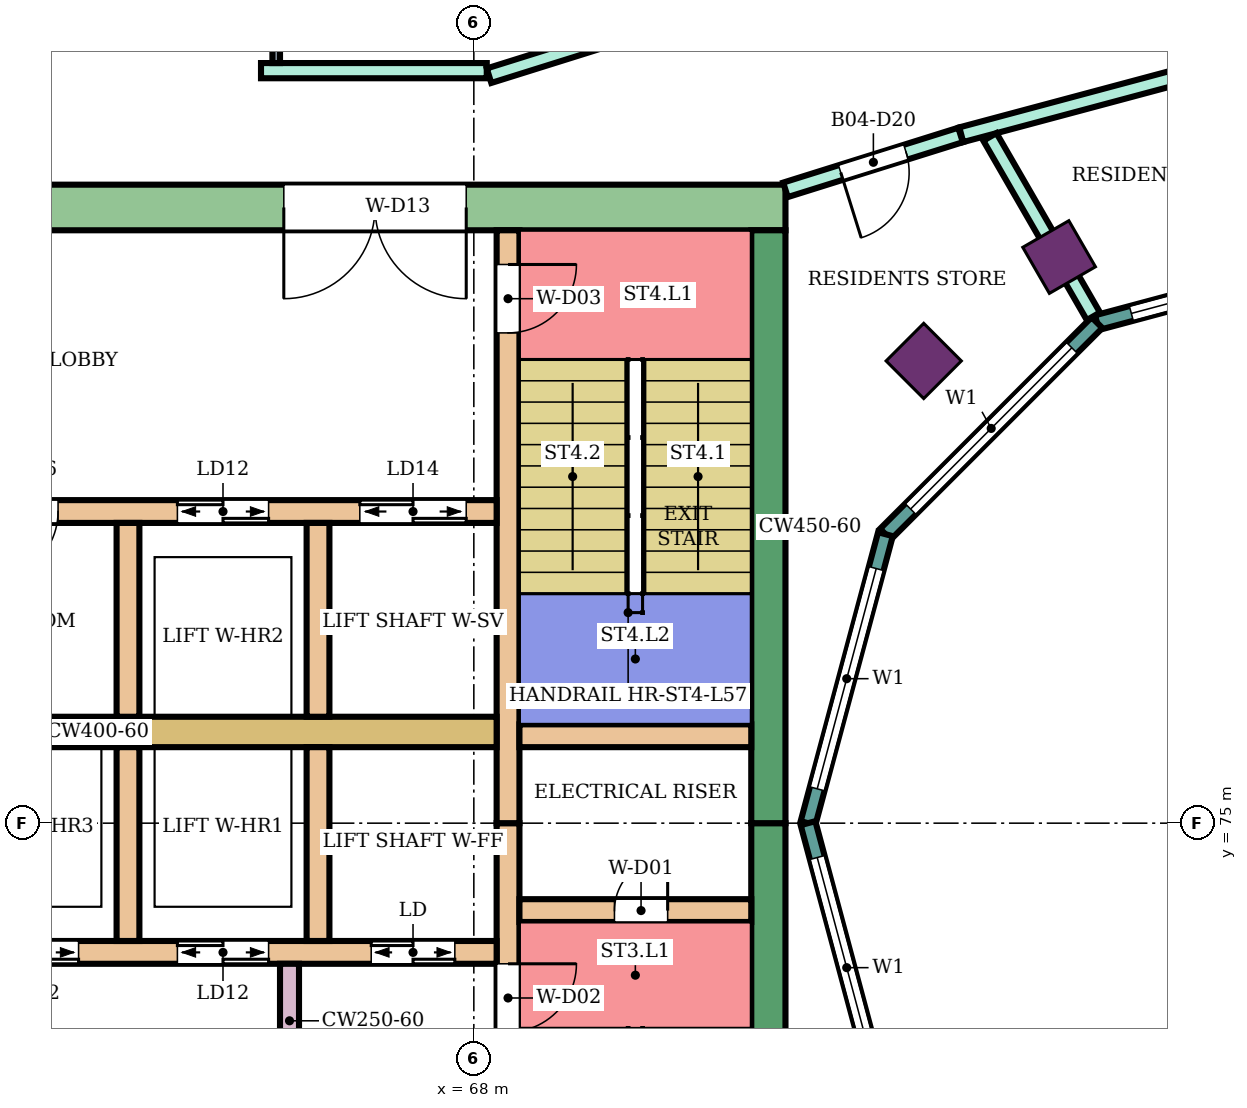
"""IFC4 building model, lengths in metres.
Left out: names, types, materials, properties, quantities, classifications, styles, units other than length and angle.
Written with IfcOpenShell. Run it as: python <this file> out.ifc"""

import sys

from ifc_helpers import new_model, si_unit, direction, frame, frame_2d, origin, origin_2d, place, context, subcontext, project, spatial, rectangle, extrude, element, fill, save


model = new_model("IFC4")
c1 = context("Model", 3, precision=1e-05, world=origin(), true_north=direction((0.0, 1.0)))
c2 = subcontext(c1, "Body", "Model", "MODEL_VIEW")
j1 = project(units=[si_unit("LENGTHUNIT", "METRE"), si_unit("PLANEANGLEUNIT", "RADIAN")], contexts=[c1])
p1 = place(None, origin())
s1 = spatial("IfcSite", under=j1, at=p1, CompositionType="ELEMENT")
p2 = place(p1, origin())
s2 = spatial("IfcBuilding", under=s1, at=p2, CompositionType="ELEMENT")
p3 = place(p2, frame((0.0, 0.0, 249.9)))
s3 = spatial("IfcBuildingStorey", under=s2, at=p3, CompositionType="ELEMENT", Elevation=249.9)
for number, where, z_axis, x_axis in (
    (1, (75.7, 82.448, 0.0), (0.0, 0.0, 1.0), (-0.5, 0.866, 0.0)),
    (2, (73.919, 81.081, 0.0), (0.0, 0.0, 1.0), (-0.707, 0.707, 0.0)),
):
    element("IfcColumn", number, at=place(p3, frame(where, z_axis=z_axis, x_axis=x_axis)), inside=s3, PredefinedType="COLUMN", context=c2, shape_type="SweptSolid", body=[
        extrude(rectangle(XDim=0.7, YDim=0.7, at=origin_2d()), origin(), (0.0, 0.0, 1.0), 4.2),
    ])
p4 = place(p3, frame((72.1, 83.1, 0.0), z_axis=(0.0, 0.0, 1.0), x_axis=(-1.0, 0.0, 0.0)))
e3 = element("IfcWall", 3, at=p4, inside=s3, PredefinedType="SHEAR", context=c2, shape_type="SweptSolid", body=[
    extrude(rectangle(XDim=14.9, YDim=0.6, at=frame_2d((7.45, 0.0))), origin(), (0.0, 0.0, 1.0), 3.88),
])
p5 = place(p4, frame((4.2, 0.0, 0.0)))
e4 = element("IfcOpeningElement", 4, at=p5, cuts=e3, PredefinedType="OPENING", context=c2, shape_type="SweptSolid", body=[
    extrude(rectangle(XDim=2.4, YDim=2.4, at=frame_2d((1.2, 1.2))), frame((0.0, 0.31, 0.0), z_axis=(0.0, -1.0, 0.0), x_axis=(1.0, 0.0, 0.0)), (0.0, 0.0, 1.0), 0.62),
])
for number, where, z_axis, x_axis in (
    (5, (71.875, 75.0, 0.0), (0.0, 0.0, 1.0), (0.0, -1.0, 0.0)),
    (6, (71.875, 82.8, 0.0), (0.0, 0.0, 1.0), (0.0, -1.0, 0.0)),
):
    element("IfcWall", number, at=place(p3, frame(where, z_axis=z_axis, x_axis=x_axis)), inside=s3, PredefinedType="SHEAR", context=c2, shape_type="SweptSolid", body=[
        extrude(rectangle(XDim=7.8, YDim=0.45, at=frame_2d((3.9, 0.0))), origin(), (0.0, 0.0, 1.0), 3.88),
    ])
p6 = place(p3, frame((68.45, 75.0, 0.0), z_axis=(0.0, 0.0, 1.0), x_axis=(0.0, -1.0, 0.0)))
e7 = element("IfcWall", 7, at=p6, inside=s3, PredefinedType="SHEAR", context=c2, shape_type="SweptSolid", body=[
    extrude(rectangle(XDim=7.8, YDim=0.3, at=frame_2d((3.9, 0.0))), origin(), (0.0, 0.0, 1.0), 3.88),
])
p7 = place(p6, frame((1.85, 0.0, 0.0)))
e8 = element("IfcOpeningElement", 8, at=p7, cuts=e7, PredefinedType="OPENING", context=c2, shape_type="SweptSolid", body=[
    extrude(rectangle(XDim=0.9, YDim=2.1, at=frame_2d((0.45, 1.05))), frame((0.0, 0.16, 0.0), z_axis=(0.0, -1.0, 0.0), x_axis=(1.0, 0.0, 0.0)), (0.0, 0.0, 1.0), 0.32),
])
p8 = place(p3, frame((68.45, 82.8, 0.0), z_axis=(0.0, 0.0, 1.0), x_axis=(0.0, -1.0, 0.0)))
e9 = element("IfcWall", 9, at=p8, inside=s3, PredefinedType="SHEAR", context=c2, shape_type="SweptSolid", body=[
    extrude(rectangle(XDim=7.8, YDim=0.3, at=frame_2d((3.9, 0.0))), origin(), (0.0, 0.0, 1.0), 3.88),
])
p9 = place(p8, frame((0.45, 0.0, 0.0)))
e10 = element("IfcOpeningElement", 10, at=p9, cuts=e9, PredefinedType="OPENING", context=c2, shape_type="SweptSolid", body=[
    extrude(rectangle(XDim=0.9, YDim=2.1, at=frame_2d((0.45, 1.05))), frame((0.0, 0.16, 0.0), z_axis=(0.0, -1.0, 0.0), x_axis=(1.0, 0.0, 0.0)), (0.0, 0.0, 1.0), 0.32),
])
p10 = place(p3, frame((71.65, 73.85, 0.0), z_axis=(0.0, 0.0, 1.0), x_axis=(-1.0, 0.0, 0.0)))
e11 = element("IfcWall", 11, at=p10, inside=s3, PredefinedType="SHEAR", context=c2, shape_type="SweptSolid", body=[
    extrude(rectangle(XDim=3.05, YDim=0.3, at=frame_2d((1.525, 0.0))), origin(), (0.0, 0.0, 1.0), 3.88),
])
p11 = place(p10, frame((1.1, 0.0, 0.0)))
e12 = element("IfcOpeningElement", 12, at=p11, cuts=e11, PredefinedType="OPENING", context=c2, shape_type="SweptSolid", body=[
    extrude(rectangle(XDim=0.7, YDim=2.0, at=frame_2d((0.35, 1.0))), frame((0.0, 0.16, 0.0), z_axis=(0.0, -1.0, 0.0), x_axis=(1.0, 0.0, 0.0)), (0.0, 0.0, 1.0), 0.32),
])
p12 = place(p3, frame((71.65, 76.15, 0.0), z_axis=(0.0, 0.0, 1.0), x_axis=(-1.0, 0.0, 0.0)))
e13 = element("IfcWall", 13, at=p12, inside=s3, PredefinedType="SHEAR", context=c2, shape_type="SweptSolid", body=[
    extrude(rectangle(XDim=3.05, YDim=0.3, at=frame_2d((1.525, 0.0))), origin(), (0.0, 0.0, 1.0), 3.88),
])
p13 = place(p3, frame((68.3, 73.3, 0.0), z_axis=(0.0, 0.0, 1.0), x_axis=(-1.0, 0.0, 0.0)))
e14 = element("IfcWall", 14, at=p13, inside=s3, PredefinedType="SHEAR", context=c2, shape_type="SweptSolid", body=[
    extrude(rectangle(XDim=11.1, YDim=0.3, at=frame_2d((5.55, 0.0))), origin(), (0.0, 0.0, 1.0), 3.88),
])
p14 = place(p13, frame((0.55, 0.0, 0.0)))
e15 = element("IfcOpeningElement", 15, at=p14, cuts=e14, PredefinedType="OPENING", context=c2, shape_type="SweptSolid", body=[
    extrude(rectangle(XDim=1.1, YDim=2.1, at=frame_2d((0.55, 1.05))), frame((0.0, 0.16, 0.0), z_axis=(0.0, -1.0, 0.0), x_axis=(1.0, 0.0, 0.0)), (0.0, 0.0, 1.0), 0.32),
])
p15 = place(p13, frame((3.0, 0.0, 0.0)))
e16 = element("IfcOpeningElement", 16, at=p15, cuts=e14, PredefinedType="OPENING", context=c2, shape_type="SweptSolid", body=[
    extrude(rectangle(XDim=1.2, YDim=2.1, at=frame_2d((0.6, 1.05))), frame((0.0, 0.16, 0.0), z_axis=(0.0, -1.0, 0.0), x_axis=(1.0, 0.0, 0.0)), (0.0, 0.0, 1.0), 0.32),
])
p16 = place(p13, frame((5.5, 0.0, 0.0)))
e17 = element("IfcOpeningElement", 17, at=p16, cuts=e14, PredefinedType="OPENING", context=c2, shape_type="SweptSolid", body=[
    extrude(rectangle(XDim=1.2, YDim=2.1, at=frame_2d((0.6, 1.05))), frame((0.0, 0.16, 0.0), z_axis=(0.0, -1.0, 0.0), x_axis=(1.0, 0.0, 0.0)), (0.0, 0.0, 1.0), 0.32),
])
p17 = place(p13, frame((7.77, 0.0, 0.0)))
e18 = element("IfcOpeningElement", 18, at=p17, cuts=e14, PredefinedType="OPENING", context=c2, shape_type="SweptSolid", body=[
    extrude(rectangle(XDim=0.9, YDim=2.1, at=frame_2d((0.45, 1.05))), frame((0.0, 0.16, 0.0), z_axis=(0.0, -1.0, 0.0), x_axis=(1.0, 0.0, 0.0)), (0.0, 0.0, 1.0), 0.32),
])
p18 = place(p13, frame((9.57, 0.0, 0.0)))
e19 = element("IfcOpeningElement", 19, at=p18, cuts=e14, PredefinedType="OPENING", context=c2, shape_type="SweptSolid", body=[
    extrude(rectangle(XDim=0.9, YDim=2.1, at=frame_2d((0.45, 1.05))), frame((0.0, 0.16, 0.0), z_axis=(0.0, -1.0, 0.0), x_axis=(1.0, 0.0, 0.0)), (0.0, 0.0, 1.0), 0.32),
])
p19 = place(p3, frame((68.3, 76.2, 0.0), z_axis=(0.0, 0.0, 1.0), x_axis=(-1.0, 0.0, 0.0)))
e20 = element("IfcWall", 20, at=p19, inside=s3, PredefinedType="SHEAR", context=c2, shape_type="SweptSolid", body=[
    extrude(rectangle(XDim=11.1, YDim=0.4, at=frame_2d((5.55, 0.0))), origin(), (0.0, 0.0, 1.0), 3.88),
])
p20 = place(p3, frame((68.3, 79.1, 0.0), z_axis=(0.0, 0.0, 1.0), x_axis=(-1.0, 0.0, 0.0)))
e21 = element("IfcWall", 21, at=p20, inside=s3, PredefinedType="SHEAR", context=c2, shape_type="SweptSolid", body=[
    extrude(rectangle(XDim=11.1, YDim=0.3, at=frame_2d((5.55, 0.0))), origin(), (0.0, 0.0, 1.0), 3.88),
])
p21 = place(p20, frame((0.4, 0.0, 0.0)))
e22 = element("IfcOpeningElement", 22, at=p21, cuts=e21, PredefinedType="OPENING", context=c2, shape_type="SweptSolid", body=[
    extrude(rectangle(XDim=1.4, YDim=2.1, at=frame_2d((0.7, 1.05))), frame((0.0, 0.16, 0.0), z_axis=(0.0, -1.0, 0.0), x_axis=(1.0, 0.0, 0.0)), (0.0, 0.0, 1.0), 0.32),
])
p22 = place(p20, frame((3.0, 0.0, 0.0)))
e23 = element("IfcOpeningElement", 23, at=p22, cuts=e21, PredefinedType="OPENING", context=c2, shape_type="SweptSolid", body=[
    extrude(rectangle(XDim=1.2, YDim=2.1, at=frame_2d((0.6, 1.05))), frame((0.0, 0.16, 0.0), z_axis=(0.0, -1.0, 0.0), x_axis=(1.0, 0.0, 0.0)), (0.0, 0.0, 1.0), 0.32),
])
p23 = place(p20, frame((5.77, 0.0, 0.0)))
e24 = element("IfcOpeningElement", 24, at=p23, cuts=e21, PredefinedType="OPENING", context=c2, shape_type="SweptSolid", body=[
    extrude(rectangle(XDim=0.9, YDim=2.1, at=frame_2d((0.45, 1.05))), frame((0.0, 0.16, 0.0), z_axis=(0.0, -1.0, 0.0), x_axis=(1.0, 0.0, 0.0)), (0.0, 0.0, 1.0), 0.32),
])
p24 = place(p20, frame((8.82, 0.0, 0.0)))
e25 = element("IfcOpeningElement", 25, at=p24, cuts=e21, PredefinedType="OPENING", context=c2, shape_type="SweptSolid", body=[
    extrude(rectangle(XDim=0.9, YDim=2.1, at=frame_2d((0.45, 1.05))), frame((0.0, 0.16, 0.0), z_axis=(0.0, -1.0, 0.0), x_axis=(1.0, 0.0, 0.0)), (0.0, 0.0, 1.0), 0.32),
])
for number, where, z_axis, x_axis in (
    (26, (65.95, 76.0, 0.0), (0.0, 0.0, 1.0), (0.0, -1.0, 0.0)),
    (27, (63.45, 76.0, 0.0), (0.0, 0.0, 1.0), (0.0, -1.0, 0.0)),
    (28, (65.95, 78.95, 0.0), (0.0, 0.0, 1.0), (0.0, -1.0, 0.0)),
    (29, (63.45, 78.95, 0.0), (0.0, 0.0, 1.0), (0.0, -1.0, 0.0)),
):
    element("IfcWall", number, at=place(p3, frame(where, z_axis=z_axis, x_axis=x_axis)), inside=s3, PredefinedType="SHEAR", context=c2, shape_type="SweptSolid", body=[
        extrude(rectangle(XDim=2.55, YDim=0.3, at=frame_2d((1.275, 0.0))), origin(), (0.0, 0.0, 1.0), 3.88),
    ])
p25 = place(p3, frame((65.575, 73.15, 0.0), z_axis=(0.0, 0.0, 1.0), x_axis=(0.0, -1.0, 0.0)))
e30 = element("IfcWall", 30, at=p25, inside=s3, PredefinedType="SHEAR", context=c2, shape_type="SweptSolid", body=[
    extrude(rectangle(XDim=1.5, YDim=0.25, at=frame_2d((0.75, 0.0))), origin(), (0.0, 0.0, 1.0), 3.88),
])
p26 = place(p3, frame((80.0, 82.604, 0.0), z_axis=(0.0, 0.0, 1.0), x_axis=(-0.965933654434, -0.258789828301, 0.0)))
e31 = element("IfcWall", 31, at=p26, inside=s3, PredefinedType="NOTDEFINED", context=c2, shape_type="SweptSolid", body=[
    extrude(rectangle(XDim=3.936, YDim=0.2, at=frame_2d((1.968, 0.0))), origin(), (0.0, 0.0, 1.0), 4.2),
])
p27 = place(p26, frame((0.468, 0.0, 0.9)))
e32 = element("IfcOpeningElement", 32, at=p27, cuts=e31, PredefinedType="OPENING", context=c2, shape_type="SweptSolid", body=[
    extrude(rectangle(XDim=3.0, YDim=2.3, at=frame_2d((1.5, 1.15))), frame((0.0, 0.11, 0.0), z_axis=(0.0, -1.0, 0.0), x_axis=(1.0, 0.0, 0.0)), (0.0, 0.0, 1.0), 0.22),
])
p28 = place(p3, frame((76.198, 81.585, 0.0), z_axis=(0.0, 0.0, 1.0), x_axis=(-0.707106781187, -0.707106781187, 0.0)))
e33 = element("IfcWall", 33, at=p28, inside=s3, PredefinedType="NOTDEFINED", context=c2, shape_type="SweptSolid", body=[
    extrude(rectangle(XDim=3.936, YDim=0.2, at=frame_2d((1.968, 0.0))), origin(), (0.0, 0.0, 1.0), 4.2),
])
p29 = place(p28, frame((0.468, 0.0, 0.9)))
e34 = element("IfcOpeningElement", 34, at=p29, cuts=e33, PredefinedType="OPENING", context=c2, shape_type="SweptSolid", body=[
    extrude(rectangle(XDim=3.0, YDim=2.3, at=frame_2d((1.5, 1.15))), frame((0.0, 0.11, 0.0), z_axis=(0.0, -1.0, 0.0), x_axis=(1.0, 0.0, 0.0)), (0.0, 0.0, 1.0), 0.22),
])
p30 = place(p3, frame((73.415, 78.802, 0.0), z_axis=(0.0, 0.0, 1.0), x_axis=(-0.258789828301, -0.965933654434, 0.0)))
e35 = element("IfcWall", 35, at=p30, inside=s3, PredefinedType="NOTDEFINED", context=c2, shape_type="SweptSolid", body=[
    extrude(rectangle(XDim=3.936, YDim=0.2, at=frame_2d((1.968, 0.0))), origin(), (0.0, 0.0, 1.0), 4.2),
])
p31 = place(p30, frame((0.468, 0.0, 0.9)))
e36 = element("IfcOpeningElement", 36, at=p31, cuts=e35, PredefinedType="OPENING", context=c2, shape_type="SweptSolid", body=[
    extrude(rectangle(XDim=3.0, YDim=2.3, at=frame_2d((1.5, 1.15))), frame((0.0, 0.11, 0.0), z_axis=(0.0, -1.0, 0.0), x_axis=(1.0, 0.0, 0.0)), (0.0, 0.0, 1.0), 0.22),
])
p32 = place(p3, frame((72.396, 75.0, 0.0), z_axis=(0.0, 0.0, 1.0), x_axis=(0.258789828301, -0.965933654434, 0.0)))
e37 = element("IfcWall", 37, at=p32, inside=s3, PredefinedType="NOTDEFINED", context=c2, shape_type="SweptSolid", body=[
    extrude(rectangle(XDim=3.936, YDim=0.2, at=frame_2d((1.968, 0.0))), origin(), (0.0, 0.0, 1.0), 4.2),
])
p33 = place(p32, frame((0.468, 0.0, 0.9)))
e38 = element("IfcOpeningElement", 38, at=p33, cuts=e37, PredefinedType="OPENING", context=c2, shape_type="SweptSolid", body=[
    extrude(rectangle(XDim=3.0, YDim=2.3, at=frame_2d((1.5, 1.15))), frame((0.0, 0.11, 0.0), z_axis=(0.0, -1.0, 0.0), x_axis=(1.0, 0.0, 0.0)), (0.0, 0.0, 1.0), 0.22),
])
p34 = place(p3, frame((65.2, 84.9, 0.0), z_axis=(0.0, 0.0, 1.0), x_axis=(1.0, 0.0, 0.0)))
e39 = element("IfcWall", 39, at=p34, inside=s3, PredefinedType="PARTITIONING", context=c2, shape_type="SweptSolid", body=[
    extrude(rectangle(XDim=2.97, YDim=0.2, at=frame_2d((1.485, 0.0))), origin(), (0.0, 0.0, 1.0), 3.75),
])
p35 = place(p3, frame((68.2, 84.834, 0.0), z_axis=(0.0, 0.0, 1.0), x_axis=(0.954260265251, 0.298977166624, 0.0)))
e40 = element("IfcWall", 40, at=p35, inside=s3, PredefinedType="PARTITIONING", context=c2, shape_type="SweptSolid", body=[
    extrude(rectangle(XDim=5.741, YDim=0.2, at=frame_2d((2.87, 0.0))), origin(), (0.0, 0.0, 1.0), 3.75),
])
p36 = place(p3, frame((72.1, 83.332, 0.0), z_axis=(0.0, 0.0, 1.0), x_axis=(0.954233106619, 0.299063836383, 0.0)))
e41 = element("IfcWall", 41, at=p36, inside=s3, PredefinedType="PARTITIONING", context=c2, shape_type="SweptSolid", body=[
    extrude(rectangle(XDim=2.414, YDim=0.2, at=frame_2d((1.207, 0.0))), origin(), (0.0, 0.0, 1.0), 3.75),
])
p37 = place(p36, frame((0.762, 0.0, 0.0)))
e42 = element("IfcOpeningElement", 42, at=p37, cuts=e41, PredefinedType="OPENING", context=c2, shape_type="SweptSolid", body=[
    extrude(rectangle(XDim=0.9, YDim=2.1, at=frame_2d((0.45, 1.05))), frame((0.0, 0.11, 0.0), z_axis=(0.0, -1.0, 0.0), x_axis=(1.0, 0.0, 0.0)), (0.0, 0.0, 1.0), 0.22),
])
p38 = place(p3, frame((74.413, 84.057, 0.0), z_axis=(0.0, 0.0, 1.0), x_axis=(0.965970849692, 0.258650956976, 0.0)))
e43 = element("IfcWall", 43, at=p38, inside=s3, PredefinedType="PARTITIONING", context=c2, shape_type="SweptSolid", body=[
    extrude(rectangle(XDim=5.734, YDim=0.2, at=frame_2d((2.867, 0.0))), origin(), (0.0, 0.0, 1.0), 3.75),
])
p39 = place(p3, frame((74.79, 84.028, 0.0), z_axis=(0.0, 0.0, 1.0), x_axis=(0.499859501914, -0.866106505198, 0.0)))
e44 = element("IfcWall", 44, at=p39, inside=s3, PredefinedType="PARTITIONING", context=c2, shape_type="SweptSolid", body=[
    extrude(rectangle(XDim=2.724, YDim=0.2, at=frame_2d((1.362, 0.0))), origin(), (0.0, 0.0, 1.0), 3.75),
])
p40 = place(p3, frame((65.4, 85.0, 0.0), z_axis=(0.0, 0.0, 1.0), x_axis=(0.0, 1.0, 0.0)))
e45 = element("IfcWall", 45, at=p40, inside=s3, PredefinedType="PARTITIONING", context=c2, shape_type="SweptSolid", body=[
    extrude(rectangle(XDim=3.45, YDim=0.1, at=frame_2d((1.725, 0.0))), origin(), (0.0, 0.0, 1.0), 3.75),
])
p41 = place(p40, frame((1.3, 0.0, 0.0)))
e46 = element("IfcOpeningElement", 46, at=p41, cuts=e45, PredefinedType="OPENING", context=c2, shape_type="SweptSolid", body=[
    extrude(rectangle(XDim=0.8, YDim=2.1, at=frame_2d((0.4, 1.05))), frame((0.0, 0.06, 0.0), z_axis=(0.0, -1.0, 0.0), x_axis=(1.0, 0.0, 0.0)), (0.0, 0.0, 1.0), 0.12),
])
p42 = place(p27, origin())
e47 = element("IfcWindow", 47, at=p42, inside=s3, PartitioningType="SINGLE_PANEL", PredefinedType="WINDOW", context=c2, shape_type="SweptSolid", body=[
    extrude(rectangle(XDim=3.0, YDim=2.3, at=frame_2d((1.5, 1.15))), frame((0.0, 0.03, 0.0), z_axis=(0.0, -1.0, 0.0), x_axis=(1.0, 0.0, 0.0)), (0.0, 0.0, 1.0), 0.06),
])
fill(e32, e47)
p43 = place(p29, origin())
e48 = element("IfcWindow", 48, at=p43, inside=s3, PartitioningType="SINGLE_PANEL", PredefinedType="WINDOW", context=c2, shape_type="SweptSolid", body=[
    extrude(rectangle(XDim=3.0, YDim=2.3, at=frame_2d((1.5, 1.15))), frame((0.0, 0.03, 0.0), z_axis=(0.0, -1.0, 0.0), x_axis=(1.0, 0.0, 0.0)), (0.0, 0.0, 1.0), 0.06),
])
fill(e34, e48)
p44 = place(p31, origin())
e49 = element("IfcWindow", 49, at=p44, inside=s3, PartitioningType="SINGLE_PANEL", PredefinedType="WINDOW", context=c2, shape_type="SweptSolid", body=[
    extrude(rectangle(XDim=3.0, YDim=2.3, at=frame_2d((1.5, 1.15))), frame((0.0, 0.03, 0.0), z_axis=(0.0, -1.0, 0.0), x_axis=(1.0, 0.0, 0.0)), (0.0, 0.0, 1.0), 0.06),
])
fill(e36, e49)
p45 = place(p33, origin())
e50 = element("IfcWindow", 50, at=p45, inside=s3, PartitioningType="SINGLE_PANEL", PredefinedType="WINDOW", context=c2, shape_type="SweptSolid", body=[
    extrude(rectangle(XDim=3.0, YDim=2.3, at=frame_2d((1.5, 1.15))), frame((0.0, 0.03, 0.0), z_axis=(0.0, -1.0, 0.0), x_axis=(1.0, 0.0, 0.0)), (0.0, 0.0, 1.0), 0.06),
])
fill(e38, e50)
p46 = place(p37, frame((0.9, 0.0, 0.0), z_axis=(0.0, 0.0, 1.0), x_axis=(-1.0, 0.0, 0.0)))
e51 = element("IfcDoor", 51, at=p46, inside=s3, OperationType="SINGLE_SWING_RIGHT", PredefinedType="DOOR", context=c2, shape_type="SweptSolid", body=[
    extrude(rectangle(XDim=0.9, YDim=2.1, at=frame_2d((0.45, 1.05))), frame((0.0, 0.025, 0.0), z_axis=(0.0, -1.0, 0.0), x_axis=(1.0, 0.0, 0.0)), (0.0, 0.0, 1.0), 0.05),
])
fill(e42, e51)
p47 = place(p11, frame((0.7, 0.0, 0.0), z_axis=(0.0, 0.0, 1.0), x_axis=(-1.0, 0.0, 0.0)))
e52 = element("IfcDoor", 52, at=p47, inside=s3, OperationType="SINGLE_SWING_RIGHT", PredefinedType="DOOR", context=c2, shape_type="SweptSolid", body=[
    extrude(rectangle(XDim=0.7, YDim=2.0, at=frame_2d((0.35, 1.0))), frame((0.0, 0.025, 0.0), z_axis=(0.0, -1.0, 0.0), x_axis=(1.0, 0.0, 0.0)), (0.0, 0.0, 1.0), 0.05),
])
fill(e12, e52)
p48 = place(p7, origin())
e53 = element("IfcDoor", 53, at=p48, inside=s3, OperationType="SINGLE_SWING_LEFT", PredefinedType="DOOR", context=c2, shape_type="SweptSolid", body=[
    extrude(rectangle(XDim=0.9, YDim=2.1, at=frame_2d((0.45, 1.05))), frame((0.0, 0.025, 0.0), z_axis=(0.0, -1.0, 0.0), x_axis=(1.0, 0.0, 0.0)), (0.0, 0.0, 1.0), 0.05),
])
fill(e8, e53)
p49 = place(p9, origin())
e54 = element("IfcDoor", 54, at=p49, inside=s3, OperationType="SINGLE_SWING_LEFT", PredefinedType="DOOR", context=c2, shape_type="SweptSolid", body=[
    extrude(rectangle(XDim=0.9, YDim=2.1, at=frame_2d((0.45, 1.05))), frame((0.0, 0.025, 0.0), z_axis=(0.0, -1.0, 0.0), x_axis=(1.0, 0.0, 0.0)), (0.0, 0.0, 1.0), 0.05),
])
fill(e10, e54)
p50 = place(p14, origin())
e55 = element("IfcDoor", 55, at=p50, inside=s3, OperationType="DOUBLE_DOOR_SLIDING", PredefinedType="DOOR", context=c2, shape_type="SweptSolid", body=[
    extrude(rectangle(XDim=1.1, YDim=2.1, at=frame_2d((0.55, 1.05))), frame((0.0, 0.025, 0.0), z_axis=(0.0, -1.0, 0.0), x_axis=(1.0, 0.0, 0.0)), (0.0, 0.0, 1.0), 0.05),
])
fill(e15, e55)
p51 = place(p15, origin())
e56 = element("IfcDoor", 56, at=p51, inside=s3, OperationType="DOUBLE_DOOR_SLIDING", PredefinedType="DOOR", context=c2, shape_type="SweptSolid", body=[
    extrude(rectangle(XDim=1.2, YDim=2.1, at=frame_2d((0.6, 1.05))), frame((0.0, 0.025, 0.0), z_axis=(0.0, -1.0, 0.0), x_axis=(1.0, 0.0, 0.0)), (0.0, 0.0, 1.0), 0.05),
])
fill(e16, e56)
p52 = place(p16, origin())
e57 = element("IfcDoor", 57, at=p52, inside=s3, OperationType="DOUBLE_DOOR_SLIDING", PredefinedType="DOOR", context=c2, shape_type="SweptSolid", body=[
    extrude(rectangle(XDim=1.2, YDim=2.1, at=frame_2d((0.6, 1.05))), frame((0.0, 0.025, 0.0), z_axis=(0.0, -1.0, 0.0), x_axis=(1.0, 0.0, 0.0)), (0.0, 0.0, 1.0), 0.05),
])
fill(e17, e57)
p53 = place(p21, origin())
e58 = element("IfcDoor", 58, at=p53, inside=s3, OperationType="DOUBLE_DOOR_SLIDING", PredefinedType="DOOR", context=c2, shape_type="SweptSolid", body=[
    extrude(rectangle(XDim=1.4, YDim=2.1, at=frame_2d((0.7, 1.05))), frame((0.0, 0.025, 0.0), z_axis=(0.0, -1.0, 0.0), x_axis=(1.0, 0.0, 0.0)), (0.0, 0.0, 1.0), 0.05),
])
fill(e22, e58)
p54 = place(p22, origin())
e59 = element("IfcDoor", 59, at=p54, inside=s3, OperationType="DOUBLE_DOOR_SLIDING", PredefinedType="DOOR", context=c2, shape_type="SweptSolid", body=[
    extrude(rectangle(XDim=1.2, YDim=2.1, at=frame_2d((0.6, 1.05))), frame((0.0, 0.025, 0.0), z_axis=(0.0, -1.0, 0.0), x_axis=(1.0, 0.0, 0.0)), (0.0, 0.0, 1.0), 0.05),
])
fill(e23, e59)
p55 = place(p23, origin())
e60 = element("IfcDoor", 60, at=p55, inside=s3, OperationType="SINGLE_SWING_RIGHT", PredefinedType="DOOR", context=c2, shape_type="SweptSolid", body=[
    extrude(rectangle(XDim=0.9, YDim=2.1, at=frame_2d((0.45, 1.05))), frame((0.0, 0.025, 0.0), z_axis=(0.0, -1.0, 0.0), x_axis=(1.0, 0.0, 0.0)), (0.0, 0.0, 1.0), 0.05),
])
fill(e24, e60)
p56 = place(p5, origin())
e61 = element("IfcDoor", 61, at=p56, inside=s3, OperationType="DOUBLE_DOOR_SINGLE_SWING", PredefinedType="DOOR", context=c2, shape_type="SweptSolid", body=[
    extrude(rectangle(XDim=2.4, YDim=2.4, at=frame_2d((1.2, 1.2))), frame((0.0, 0.025, 0.0), z_axis=(0.0, -1.0, 0.0), x_axis=(1.0, 0.0, 0.0)), (0.0, 0.0, 1.0), 0.05),
])
fill(e4, e61)
save(model, sys.argv[1])
